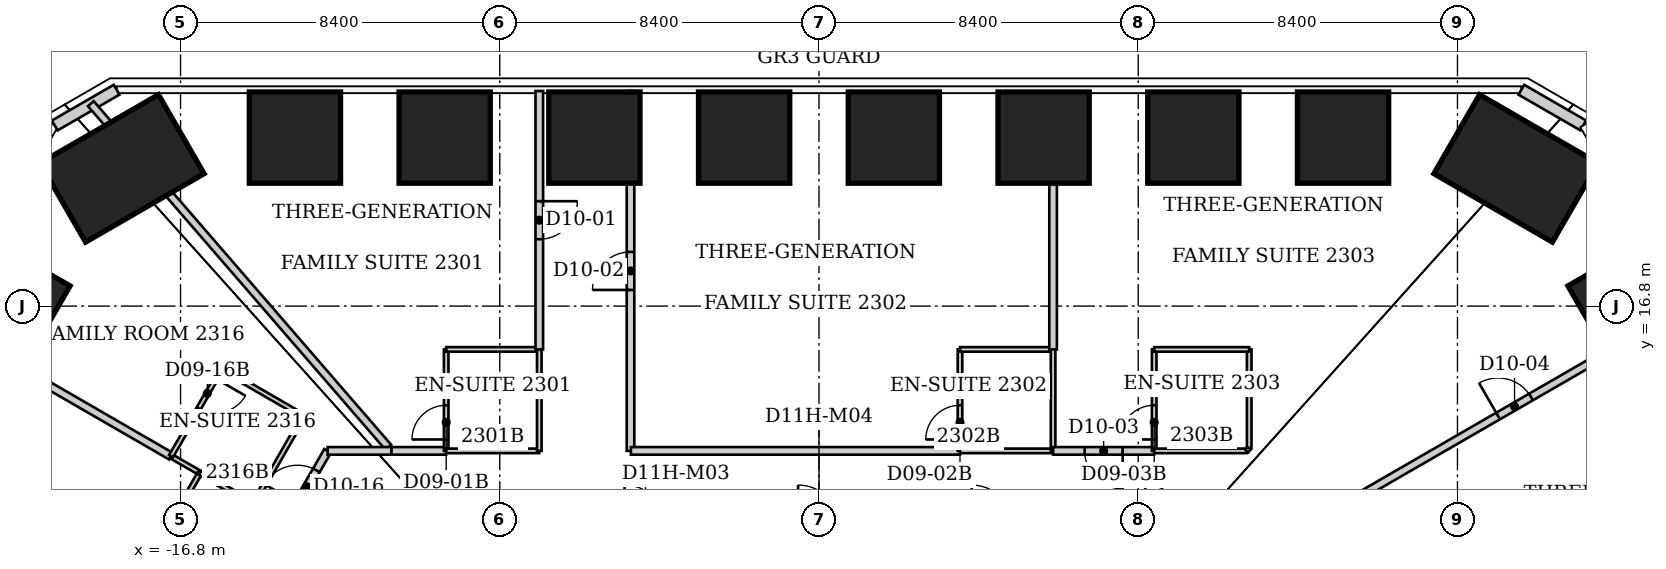
"""IFC4 building model, lengths in metres.
Left out: names, types, materials, properties, quantities, classifications, styles, units other than length and angle.
Written with IfcOpenShell. Run it as: python <this file> out.ifc"""

import sys

from ifc_helpers import new_model, si_unit, direction, frame, frame_2d, origin, origin_2d, place, context, subcontext, project, spatial, rectangle, extrude, clip, halfspace, element, fill, save


model = new_model("IFC4")
c1 = context("Model", 3, precision=1e-05, world=origin(), true_north=direction((0.0, 1.0)))
c2 = subcontext(c1, "Body", "Model", "MODEL_VIEW")
j1 = project(units=[si_unit("LENGTHUNIT", "METRE"), si_unit("PLANEANGLEUNIT", "RADIAN")], contexts=[c1])
p1 = place(None, origin())
s1 = spatial("IfcSite", under=j1, at=p1, CompositionType="ELEMENT")
p2 = place(p1, origin())
s2 = spatial("IfcBuilding", under=s1, at=p2, CompositionType="ELEMENT")
p3 = place(p2, frame((0.0, 0.0, 96.8)))
s3 = spatial("IfcBuildingStorey", under=s2, at=p3, CompositionType="ELEMENT", Elevation=96.8)
p4 = place(p3, frame((-13.79, 21.234, -0.073), z_axis=(0.0, 0.0, 1.0), x_axis=(0.0, 1.0, 0.0)))
e1 = element("IfcColumn", 1, at=p4, inside=s3, PredefinedType="COLUMN", context=c2, shape_type="SweptSolid", body=[
    clip(extrude(rectangle(XDim=2.4, YDim=2.4, at=origin_2d()), origin(), (0.0, 0.0, 1.0), 3.873), halfspace(frame((0.0, 0.0, 0.073)), True)),
])
p5 = place(p3, frame((-9.85, 21.234, -0.064), z_axis=(0.0, 0.0, 1.0), x_axis=(0.0, 1.0, 0.0)))
e2 = element("IfcColumn", 2, at=p5, inside=s3, PredefinedType="COLUMN", context=c2, shape_type="SweptSolid", body=[
    clip(extrude(rectangle(XDim=2.4, YDim=2.4, at=origin_2d()), origin(), (0.0, 0.0, 1.0), 3.865), halfspace(frame((0.0, 0.0, 0.064)), True)),
])
p6 = place(p3, frame((-5.91, 21.234, -0.056), z_axis=(0.0, 0.0, 1.0), x_axis=(0.0, 1.0, 0.0)))
e3 = element("IfcColumn", 3, at=p6, inside=s3, PredefinedType="COLUMN", context=c2, shape_type="SweptSolid", body=[
    clip(extrude(rectangle(XDim=2.4, YDim=2.4, at=origin_2d()), origin(), (0.0, 0.0, 1.0), 3.856), halfspace(frame((0.0, 0.0, 0.056)), True)),
])
for number, where, z_axis, x_axis in (
    (4, (-1.97, 21.234, -0.048), (0.0, 0.0, 1.0), (0.0, 1.0, 0.0)),
    (5, (1.97, 21.234, -0.048), (0.0, 0.0, 1.0), (0.0, 1.0, 0.0)),
):
    element("IfcColumn", number, at=place(p3, frame(where, z_axis=z_axis, x_axis=x_axis)), inside=s3, PredefinedType="COLUMN", context=c2, shape_type="SweptSolid", body=[
        clip(extrude(rectangle(XDim=2.4, YDim=2.4, at=origin_2d()), origin(), (0.0, 0.0, 1.0), 3.848), halfspace(frame((0.0, 0.0, 0.048)), True)),
    ])
p7 = place(p3, frame((5.91, 21.234, -0.056), z_axis=(0.0, 0.0, 1.0), x_axis=(0.0, 1.0, 0.0)))
e6 = element("IfcColumn", 6, at=p7, inside=s3, PredefinedType="COLUMN", context=c2, shape_type="SweptSolid", body=[
    clip(extrude(rectangle(XDim=2.4, YDim=2.4, at=origin_2d()), origin(), (0.0, 0.0, 1.0), 3.856), halfspace(frame((0.0, 0.0, 0.056)), True)),
])
p8 = place(p3, frame((9.85, 21.234, -0.064), z_axis=(0.0, 0.0, 1.0), x_axis=(0.0, 1.0, 0.0)))
e7 = element("IfcColumn", 7, at=p8, inside=s3, PredefinedType="COLUMN", context=c2, shape_type="SweptSolid", body=[
    clip(extrude(rectangle(XDim=2.4, YDim=2.4, at=origin_2d()), origin(), (0.0, 0.0, 1.0), 3.865), halfspace(frame((0.0, 0.0, 0.064)), True)),
])
p9 = place(p3, frame((13.79, 21.234, -0.073), z_axis=(0.0, 0.0, 1.0), x_axis=(0.0, 1.0, 0.0)))
e8 = element("IfcColumn", 8, at=p9, inside=s3, PredefinedType="COLUMN", context=c2, shape_type="SweptSolid", body=[
    clip(extrude(rectangle(XDim=2.4, YDim=2.4, at=origin_2d()), origin(), (0.0, 0.0, 1.0), 3.873), halfspace(frame((0.0, 0.0, 0.073)), True)),
])
p10 = place(p3, frame((18.339, 20.424, -0.074), z_axis=(0.0, 0.0, 1.0), x_axis=(0.5, 0.866025403784, 0.0)))
e9 = element("IfcColumn", 9, at=p10, inside=s3, PredefinedType="COLUMN", context=c2, shape_type="SweptSolid", body=[
    clip(extrude(rectangle(XDim=2.4, YDim=3.6, at=origin_2d()), origin(), (0.0, 0.0, 1.0), 3.874), halfspace(frame((0.0, 0.0, 0.074)), True)),
])
for number, where, z_axis, x_axis in (
    (10, (21.346, 16.891, -0.063), (0.0, 0.0, 1.0), (0.866, 0.5, 0.0)),
    (11, (-21.346, 16.891, -0.063), (0.0, 0.0, 1.0), (-0.866, 0.5, 0.0)),
):
    element("IfcColumn", number, at=place(p3, frame(where, z_axis=z_axis, x_axis=x_axis)), inside=s3, PredefinedType="COLUMN", context=c2, shape_type="SweptSolid", body=[
        clip(extrude(rectangle(XDim=2.4, YDim=2.4, at=origin_2d()), origin(), (0.0, 0.0, 1.0), 3.863), halfspace(frame((0.0, 0.0, 0.063)), True)),
    ])
p11 = place(p3, frame((-18.339, 20.424, -0.074), z_axis=(0.0, 0.0, 1.0), x_axis=(-0.5, 0.866025403784, 0.0)))
e12 = element("IfcColumn", 12, at=p11, inside=s3, PredefinedType="COLUMN", context=c2, shape_type="SweptSolid", body=[
    clip(extrude(rectangle(XDim=2.4, YDim=3.6, at=origin_2d()), origin(), (0.0, 0.0, 1.0), 3.874), halfspace(frame((0.0, 0.0, 0.074)), True)),
])
for number, where, z_axis, x_axis in (
    (13, (18.481, 22.494, 0.0), (0.0, 0.0, 1.0), (0.866, -0.5, 0.0)),
    (14, (-20.11, 21.554, 0.0), (0.0, 0.0, 1.0), (0.866, 0.5, 0.0)),
):
    element("IfcWall", number, at=place(p3, frame(where, z_axis=z_axis, x_axis=x_axis)), inside=s3, PredefinedType="SOLIDWALL", context=c2, shape_type="SweptSolid", body=[
        extrude(rectangle(XDim=1.88, YDim=0.3, at=frame_2d((0.94, 0.0))), origin(), (0.0, 0.0, 1.0), 3.64),
    ])
for number, where, z_axis, x_axis in (
    (15, (-19.75, 24.133, 0.0), (0.0, 0.0, 1.0), (-0.866, -0.499, 0.0)),
    (16, (21.475, 23.139, 0.0), (0.0, 0.0, 1.0), (-0.866, 0.499, 0.0)),
):
    element("IfcWall", number, at=place(p3, frame(where, z_axis=z_axis, x_axis=x_axis)), inside=s3, PredefinedType="PARAPET", context=c2, shape_type="SweptSolid", body=[
        extrude(rectangle(XDim=1.991, YDim=0.25, at=frame_2d((0.996, 0.0))), origin(), (0.0, 0.0, 1.0), 1.1),
    ])
p12 = place(p3, frame((-23.084, 16.335, 0.0), z_axis=(0.0, 0.0, 1.0), x_axis=(0.865889693368, -0.500234983702, 0.0)))
e17 = element("IfcWall", 17, at=p12, inside=s3, PredefinedType="PARTITIONING", context=c2, shape_type="SweptSolid", body=[
    extrude(rectangle(XDim=6.968, YDim=0.2, at=frame_2d((3.484, 0.0))), origin(), (0.0, 0.0, 1.0), 3.64),
])
p13 = place(p3, frame((-17.051, 12.849, 0.0), z_axis=(0.0, 0.0, 1.0), x_axis=(0.865838315616, -0.500323906295, 0.0)))
e18 = element("IfcWall", 18, at=p13, inside=s3, PredefinedType="PARTITIONING", context=c2, shape_type="SweptSolid", body=[
    extrude(rectangle(XDim=0.878, YDim=0.12, at=frame_2d((0.439, 0.0))), origin(), (0.0, 0.0, 1.0), 3.64),
])
p14 = place(p3, frame((-16.29, 12.41, 0.0), z_axis=(0.0, 0.0, 1.0), x_axis=(-0.501547039172, -0.865130376012, 0.0)))
e19 = element("IfcWall", 19, at=p14, inside=s3, PredefinedType="PARTITIONING", context=c2, shape_type="SweptSolid", body=[
    extrude(rectangle(XDim=2.393, YDim=0.12, at=frame_2d((1.196, 0.0))), origin(), (0.0, 0.0, 1.0), 3.64),
])
p15 = place(p3, frame((-16.29, 12.41, 0.0), z_axis=(0.0, 0.0, 1.0), x_axis=(0.866138091645, -0.499804768086, 0.0)))
e20 = element("IfcWall", 20, at=p15, inside=s3, PredefinedType="PARTITIONING", context=c2, shape_type="SweptSolid", body=[
    extrude(rectangle(XDim=1.626, YDim=0.12, at=frame_2d((0.813, 0.0))), origin(), (0.0, 0.0, 1.0), 3.64),
])
p16 = place(p3, frame((-15.72, 15.15, 0.0), z_axis=(0.0, 0.0, 1.0), x_axis=(-0.500605174168, -0.865675724273, 0.0)))
e21 = element("IfcWall", 21, at=p16, inside=s3, PredefinedType="PARTITIONING", context=c2, shape_type="SweptSolid", body=[
    extrude(rectangle(XDim=2.657, YDim=0.12, at=frame_2d((1.329, 0.0))), origin(), (0.0, 0.0, 1.0), 3.64),
])
p17 = place(p16, frame((0.3, 0.0, 0.0)))
e22 = element("IfcOpeningElement", 22, at=p17, cuts=e21, PredefinedType="OPENING", context=c2, shape_type="SweptSolid", body=[
    extrude(rectangle(XDim=0.9, YDim=2.03, at=frame_2d((0.45, 1.015))), frame((0.0, 0.06, 0.0), z_axis=(0.0, -1.0, 0.0), x_axis=(1.0, 0.0, 0.0)), (0.0, 0.0, 1.0), 0.12),
])
p18 = place(p3, frame((-14.88, 11.6, 0.0), z_axis=(0.0, 0.0, 1.0), x_axis=(0.497704656183, 0.867346571569, 0.0)))
e23 = element("IfcWall", 23, at=p18, inside=s3, PredefinedType="PARTITIONING", context=c2, shape_type="SweptSolid", body=[
    extrude(rectangle(XDim=2.652, YDim=0.12, at=frame_2d((1.326, 0.0))), origin(), (0.0, 0.0, 1.0), 3.64),
])
p19 = place(p3, frame((-14.02, 11.1, 0.0), z_axis=(0.0, 0.0, 1.0), x_axis=(0.499641723021, 0.866232156305, 0.0)))
e24 = element("IfcWall", 24, at=p19, inside=s3, PredefinedType="PARTITIONING", context=c2, shape_type="SweptSolid", body=[
    extrude(rectangle(XDim=2.182, YDim=0.2, at=frame_2d((1.091, 0.0))), origin(), (0.0, 0.0, 1.0), 3.64),
])
p20 = place(p19, frame((0.591, 0.0, 0.0)))
e25 = element("IfcOpeningElement", 25, at=p20, cuts=e24, PredefinedType="OPENING", context=c2, shape_type="SweptSolid", body=[
    extrude(rectangle(XDim=1.0, YDim=2.13, at=frame_2d((0.5, 1.065))), frame((0.0, 0.1, 0.0), z_axis=(0.0, -1.0, 0.0), x_axis=(1.0, 0.0, 0.0)), (0.0, 0.0, 1.0), 0.2),
])
p21 = place(p3, frame((-13.56, 13.9, 0.0), z_axis=(0.0, 0.0, 1.0), x_axis=(-0.865508881864, 0.500893576935, 0.0)))
e26 = element("IfcWall", 26, at=p21, inside=s3, PredefinedType="PARTITIONING", context=c2, shape_type="SweptSolid", body=[
    extrude(rectangle(XDim=2.496, YDim=0.12, at=frame_2d((1.248, 0.0))), origin(), (0.0, 0.0, 1.0), 3.64),
])
p22 = place(p3, frame((-11.335, 13.088, 0.0), z_axis=(0.0, 0.0, 1.0), x_axis=(-0.654526953183, 0.75603866803, 0.0)))
e27 = element("IfcWall", 27, at=p22, inside=s3, PredefinedType="PARTITIONING", context=c2, shape_type="SweptSolid", body=[
    extrude(rectangle(XDim=11.956, YDim=0.2, at=frame_2d((5.978, 0.0))), origin(), (0.0, 0.0, 1.0), 3.64),
])
p23 = place(p3, frame((-11.25, 12.99, 0.0), z_axis=(0.0, 0.0, 1.0), x_axis=(-1.0, 0.0, 0.0)))
e28 = element("IfcWall", 28, at=p23, inside=s3, PredefinedType="PARTITIONING", context=c2, shape_type="SweptSolid", body=[
    extrude(rectangle(XDim=1.68, YDim=0.2, at=frame_2d((0.84, 0.0))), origin(), (0.0, 0.0, 1.0), 3.64),
])
p24 = place(p3, frame((-9.81, 12.99, 0.0), z_axis=(0.0, 0.0, 1.0), x_axis=(-1.0, 0.0, 0.0)))
e29 = element("IfcWall", 29, at=p24, inside=s3, PredefinedType="PARTITIONING", context=c2, shape_type="SweptSolid", body=[
    extrude(rectangle(XDim=1.44, YDim=0.2, at=frame_2d((0.72, 0.0))), origin(), (0.0, 0.0, 1.0), 3.64),
])
p25 = place(p3, frame((-9.81, 15.66, 0.0), z_axis=(0.0, 0.0, 1.0), x_axis=(0.0, -1.0, 0.0)))
e30 = element("IfcWall", 30, at=p25, inside=s3, PredefinedType="PARTITIONING", context=c2, shape_type="SweptSolid", body=[
    extrude(rectangle(XDim=2.67, YDim=0.12, at=frame_2d((1.335, 0.0))), origin(), (0.0, 0.0, 1.0), 3.038),
])
p26 = place(p25, frame((1.47, 0.0, 0.0)))
e31 = element("IfcOpeningElement", 31, at=p26, cuts=e30, PredefinedType="OPENING", context=c2, shape_type="SweptSolid", body=[
    extrude(rectangle(XDim=0.9, YDim=2.03, at=frame_2d((0.45, 1.015))), frame((0.0, 0.06, 0.0), z_axis=(0.0, -1.0, 0.0), x_axis=(1.0, 0.0, 0.0)), (0.0, 0.0, 1.0), 0.12),
])
for number, where, z_axis, x_axis in (
    (32, (-7.36, 12.99, 0.0), (0.0, 0.0, 1.0), (-1.0, 0.0, 0.0)),
    (33, (-7.36, 15.66, 0.0), (0.0, 0.0, 1.0), (-1.0, 0.0, 0.0)),
):
    element("IfcWall", number, at=place(p3, frame(where, z_axis=z_axis, x_axis=x_axis)), inside=s3, PredefinedType="PARTITIONING", context=c2, shape_type="SweptSolid", body=[
        extrude(rectangle(XDim=2.45, YDim=0.12, at=frame_2d((1.225, 0.0))), origin(), (0.0, 0.0, 1.0), 3.64),
    ])
p27 = place(p3, frame((-7.36, 15.66, 0.0), z_axis=(0.0, 0.0, 1.0), x_axis=(0.0, -1.0, 0.0)))
e34 = element("IfcWall", 34, at=p27, inside=s3, PredefinedType="PARTITIONING", context=c2, shape_type="SweptSolid", body=[
    extrude(rectangle(XDim=2.67, YDim=0.12, at=frame_2d((1.335, 0.0))), origin(), (0.0, 0.0, 1.0), 3.64),
])
p28 = place(p3, frame((-7.36, 22.46, 0.0), z_axis=(0.0, 0.0, 1.0), x_axis=(0.0, -1.0, 0.0)))
e35 = element("IfcWall", 35, at=p28, inside=s3, PredefinedType="PARTITIONING", context=c2, shape_type="SweptSolid", body=[
    extrude(rectangle(XDim=6.8, YDim=0.2, at=frame_2d((3.4, 0.0))), origin(), (0.0, 0.0, 1.0), 3.64),
])
p29 = place(p28, frame((2.9, 0.0, 0.0)))
e36 = element("IfcOpeningElement", 36, at=p29, cuts=e35, PredefinedType="OPENING", context=c2, shape_type="SweptSolid", body=[
    extrude(rectangle(XDim=1.0, YDim=2.13, at=frame_2d((0.5, 1.065))), frame((0.0, 0.1, 0.0), z_axis=(0.0, -1.0, 0.0), x_axis=(1.0, 0.0, 0.0)), (0.0, 0.0, 1.0), 0.2),
])
p30 = place(p3, frame((-4.96, 12.99, 0.0), z_axis=(0.0, 0.0, 1.0), x_axis=(0.0, 1.0, 0.0)))
e37 = element("IfcWall", 37, at=p30, inside=s3, PredefinedType="PARTITIONING", context=c2, shape_type="SweptSolid", body=[
    extrude(rectangle(XDim=9.47, YDim=0.2, at=frame_2d((4.735, 0.0))), origin(), (0.0, 0.0, 1.0), 3.64),
])
p31 = place(p30, frame((4.235, 0.0, 0.0)))
e38 = element("IfcOpeningElement", 38, at=p31, cuts=e37, PredefinedType="OPENING", context=c2, shape_type="SweptSolid", body=[
    extrude(rectangle(XDim=1.0, YDim=2.13, at=frame_2d((0.5, 1.065))), frame((0.0, 0.1, 0.0), z_axis=(0.0, -1.0, 0.0), x_axis=(1.0, 0.0, 0.0)), (0.0, 0.0, 1.0), 0.2),
])
p32 = place(p3, frame((3.71, 12.99, 0.0), z_axis=(0.0, 0.0, 1.0), x_axis=(-1.0, 0.0, 0.0)))
e39 = element("IfcWall", 39, at=p32, inside=s3, PredefinedType="PARTITIONING", context=c2, shape_type="SweptSolid", body=[
    extrude(rectangle(XDim=8.66, YDim=0.2, at=frame_2d((4.33, 0.0))), origin(), (0.0, 0.0, 1.0), 3.64),
])
p33 = place(p3, frame((3.71, 15.66, 0.0), z_axis=(0.0, 0.0, 1.0), x_axis=(0.0, -1.0, 0.0)))
e40 = element("IfcWall", 40, at=p33, inside=s3, PredefinedType="PARTITIONING", context=c2, shape_type="SweptSolid", body=[
    extrude(rectangle(XDim=2.67, YDim=0.12, at=frame_2d((1.335, 0.0))), origin(), (0.0, 0.0, 1.0), 3.64),
])
p34 = place(p33, frame((1.47, 0.0, 0.0)))
e41 = element("IfcOpeningElement", 41, at=p34, cuts=e40, PredefinedType="OPENING", context=c2, shape_type="SweptSolid", body=[
    extrude(rectangle(XDim=0.9, YDim=2.03, at=frame_2d((0.45, 1.015))), frame((0.0, 0.06, 0.0), z_axis=(0.0, -1.0, 0.0), x_axis=(1.0, 0.0, 0.0)), (0.0, 0.0, 1.0), 0.12),
])
for number, where, z_axis, x_axis in (
    (42, (6.16, 12.99, 0.0), (0.0, 0.0, 1.0), (-1.0, 0.0, 0.0)),
    (43, (6.16, 15.66, 0.0), (0.0, 0.0, 1.0), (-1.0, 0.0, 0.0)),
):
    element("IfcWall", number, at=place(p3, frame(where, z_axis=z_axis, x_axis=x_axis)), inside=s3, PredefinedType="PARTITIONING", context=c2, shape_type="SweptSolid", body=[
        extrude(rectangle(XDim=2.45, YDim=0.12, at=frame_2d((1.225, 0.0))), origin(), (0.0, 0.0, 1.0), 3.64),
    ])
p35 = place(p3, frame((6.16, 15.66, 0.0), z_axis=(0.0, 0.0, 1.0), x_axis=(0.0, -1.0, 0.0)))
e44 = element("IfcWall", 44, at=p35, inside=s3, PredefinedType="PARTITIONING", context=c2, shape_type="SweptSolid", body=[
    extrude(rectangle(XDim=2.67, YDim=0.12, at=frame_2d((1.335, 0.0))), origin(), (0.0, 0.0, 1.0), 3.64),
])
p36 = place(p3, frame((6.16, 22.37, 0.0), z_axis=(0.0, 0.0, 1.0), x_axis=(0.0, -1.0, 0.0)))
e45 = element("IfcWall", 45, at=p36, inside=s3, PredefinedType="PARTITIONING", context=c2, shape_type="SweptSolid", body=[
    extrude(rectangle(XDim=6.71, YDim=0.2, at=frame_2d((3.355, 0.0))), origin(), (0.0, 0.0, 1.0), 3.64),
])
p37 = place(p3, frame((8.82, 12.99, 0.0), z_axis=(0.0, 0.0, 1.0), x_axis=(-1.0, 0.0, 0.0)))
e46 = element("IfcWall", 46, at=p37, inside=s3, PredefinedType="PARTITIONING", context=c2, shape_type="SweptSolid", body=[
    extrude(rectangle(XDim=2.66, YDim=0.2, at=frame_2d((1.33, 0.0))), origin(), (0.0, 0.0, 1.0), 3.64),
])
p38 = place(p37, frame((0.83, 0.0, 0.0)))
e47 = element("IfcOpeningElement", 47, at=p38, cuts=e46, PredefinedType="OPENING", context=c2, shape_type="SweptSolid", body=[
    extrude(rectangle(XDim=1.0, YDim=2.13, at=frame_2d((0.5, 1.065))), frame((0.0, 0.1, 0.0), z_axis=(0.0, -1.0, 0.0), x_axis=(1.0, 0.0, 0.0)), (0.0, 0.0, 1.0), 0.2),
])
p39 = place(p3, frame((8.82, 15.66, 0.0), z_axis=(0.0, 0.0, 1.0), x_axis=(0.0, -1.0, 0.0)))
e48 = element("IfcWall", 48, at=p39, inside=s3, PredefinedType="PARTITIONING", context=c2, shape_type="SweptSolid", body=[
    extrude(rectangle(XDim=2.67, YDim=0.12, at=frame_2d((1.335, 0.0))), origin(), (0.0, 0.0, 1.0), 3.64),
])
p40 = place(p39, frame((1.47, 0.0, 0.0)))
e49 = element("IfcOpeningElement", 49, at=p40, cuts=e48, PredefinedType="OPENING", context=c2, shape_type="SweptSolid", body=[
    extrude(rectangle(XDim=0.9, YDim=2.03, at=frame_2d((0.45, 1.015))), frame((0.0, 0.06, 0.0), z_axis=(0.0, -1.0, 0.0), x_axis=(1.0, 0.0, 0.0)), (0.0, 0.0, 1.0), 0.12),
])
p41 = place(p3, frame((11.25, 12.99, 0.0), z_axis=(0.0, 0.0, 1.0), x_axis=(-1.0, 0.0, 0.0)))
e50 = element("IfcWall", 50, at=p41, inside=s3, PredefinedType="PARTITIONING", context=c2, shape_type="SweptSolid", body=[
    extrude(rectangle(XDim=2.43, YDim=0.12, at=frame_2d((1.215, 0.0))), origin(), (0.0, 0.0, 1.0), 3.64),
])
p42 = place(p3, frame((11.32, 13.07, 0.0), z_axis=(0.0, 0.0, 1.0), x_axis=(-0.658504607869, -0.752576694707, 0.0)))
e51 = element("IfcWall", 51, at=p42, inside=s3, PredefinedType="PARTITIONING", context=c2, shape_type="SweptSolid", body=[
    extrude(rectangle(XDim=0.106, YDim=0.12, at=frame_2d((0.053, 0.0))), origin(), (0.0, 0.0, 1.0), 3.64),
])
p43 = place(p3, frame((11.32, 13.07, 0.0), z_axis=(0.0, 0.0, 1.0), x_axis=(0.0, 1.0, 0.0)))
e52 = element("IfcWall", 52, at=p43, inside=s3, PredefinedType="PARTITIONING", context=c2, shape_type="SweptSolid", body=[
    extrude(rectangle(XDim=2.59, YDim=0.12, at=frame_2d((1.295, 0.0))), origin(), (0.0, 0.0, 1.0), 3.64),
])
p44 = place(p3, frame((11.32, 15.66, 0.0), z_axis=(0.0, 0.0, 1.0), x_axis=(-1.0, 0.0, 0.0)))
e53 = element("IfcWall", 53, at=p44, inside=s3, PredefinedType="PARTITIONING", context=c2, shape_type="SweptSolid", body=[
    extrude(rectangle(XDim=2.5, YDim=0.12, at=frame_2d((1.25, 0.0))), origin(), (0.0, 0.0, 1.0), 3.64),
])
p45 = place(p3, frame((13.77, 11.54, 0.0), z_axis=(0.0, 0.0, 1.0), x_axis=(0.865951726818, 0.500127590541, 0.0)))
e54 = element("IfcWall", 54, at=p45, inside=s3, PredefinedType="PARTITIONING", context=c2, shape_type="SweptSolid", body=[
    extrude(rectangle(XDim=10.467, YDim=0.2, at=frame_2d((5.233, 0.0))), origin(), (0.0, 0.0, 1.0), 3.64),
])
p46 = place(p45, frame((4.734, 0.0, 0.0)))
e55 = element("IfcOpeningElement", 55, at=p46, cuts=e54, PredefinedType="OPENING", context=c2, shape_type="SweptSolid", body=[
    extrude(rectangle(XDim=1.0, YDim=2.13, at=frame_2d((0.5, 1.065))), frame((0.0, 0.1, 0.0), z_axis=(0.0, -1.0, 0.0), x_axis=(1.0, 0.0, 0.0)), (0.0, 0.0, 1.0), 0.2),
])
p47 = place(p29, origin())
e56 = element("IfcDoor", 56, at=p47, inside=s3, OperationType="SINGLE_SWING_LEFT", PredefinedType="DOOR", context=c2, shape_type="SweptSolid", body=[
    extrude(rectangle(XDim=1.0, YDim=2.13, at=frame_2d((0.5, 1.065))), frame((0.0, 0.025, 0.0), z_axis=(0.0, -1.0, 0.0), x_axis=(1.0, 0.0, 0.0)), (0.0, 0.0, 1.0), 0.05),
])
fill(e36, e56)
p48 = place(p26, origin())
e57 = element("IfcDoor", 57, at=p48, inside=s3, OperationType="SINGLE_SWING_RIGHT", PredefinedType="DOOR", context=c2, shape_type="SweptSolid", body=[
    extrude(rectangle(XDim=0.9, YDim=2.03, at=frame_2d((0.45, 1.015))), frame((0.0, 0.025, 0.0), z_axis=(0.0, -1.0, 0.0), x_axis=(1.0, 0.0, 0.0)), (0.0, 0.0, 1.0), 0.05),
])
fill(e31, e57)
p49 = place(p31, origin())
e58 = element("IfcDoor", 58, at=p49, inside=s3, OperationType="SINGLE_SWING_LEFT", PredefinedType="DOOR", context=c2, shape_type="SweptSolid", body=[
    extrude(rectangle(XDim=1.0, YDim=2.13, at=frame_2d((0.5, 1.065))), frame((0.0, 0.025, 0.0), z_axis=(0.0, -1.0, 0.0), x_axis=(1.0, 0.0, 0.0)), (0.0, 0.0, 1.0), 0.05),
])
fill(e38, e58)
p50 = place(p34, origin())
e59 = element("IfcDoor", 59, at=p50, inside=s3, OperationType="SINGLE_SWING_RIGHT", PredefinedType="DOOR", context=c2, shape_type="SweptSolid", body=[
    extrude(rectangle(XDim=0.9, YDim=2.03, at=frame_2d((0.45, 1.015))), frame((0.0, 0.025, 0.0), z_axis=(0.0, -1.0, 0.0), x_axis=(1.0, 0.0, 0.0)), (0.0, 0.0, 1.0), 0.05),
])
fill(e41, e59)
p51 = place(p38, origin())
e60 = element("IfcDoor", 60, at=p51, inside=s3, OperationType="SINGLE_SWING_LEFT", PredefinedType="DOOR", context=c2, shape_type="SweptSolid", body=[
    extrude(rectangle(XDim=1.0, YDim=2.13, at=frame_2d((0.5, 1.065))), frame((0.0, 0.025, 0.0), z_axis=(0.0, -1.0, 0.0), x_axis=(1.0, 0.0, 0.0)), (0.0, 0.0, 1.0), 0.05),
])
fill(e47, e60)
p52 = place(p40, origin())
e61 = element("IfcDoor", 61, at=p52, inside=s3, OperationType="SINGLE_SWING_RIGHT", PredefinedType="DOOR", context=c2, shape_type="SweptSolid", body=[
    extrude(rectangle(XDim=0.9, YDim=2.03, at=frame_2d((0.45, 1.015))), frame((0.0, 0.025, 0.0), z_axis=(0.0, -1.0, 0.0), x_axis=(1.0, 0.0, 0.0)), (0.0, 0.0, 1.0), 0.05),
])
fill(e49, e61)
p53 = place(p46, origin())
e62 = element("IfcDoor", 62, at=p53, inside=s3, OperationType="SINGLE_SWING_LEFT", PredefinedType="DOOR", context=c2, shape_type="SweptSolid", body=[
    extrude(rectangle(XDim=1.0, YDim=2.13, at=frame_2d((0.5, 1.065))), frame((0.0, 0.025, 0.0), z_axis=(0.0, -1.0, 0.0), x_axis=(1.0, 0.0, 0.0)), (0.0, 0.0, 1.0), 0.05),
])
fill(e55, e62)
p54 = place(p20, origin())
e63 = element("IfcDoor", 63, at=p54, inside=s3, OperationType="SINGLE_SWING_LEFT", PredefinedType="DOOR", context=c2, shape_type="SweptSolid", body=[
    extrude(rectangle(XDim=1.0, YDim=2.13, at=frame_2d((0.5, 1.065))), frame((0.0, 0.025, 0.0), z_axis=(0.0, -1.0, 0.0), x_axis=(1.0, 0.0, 0.0)), (0.0, 0.0, 1.0), 0.05),
])
fill(e25, e63)
p55 = place(p17, origin())
e64 = element("IfcDoor", 64, at=p55, inside=s3, OperationType="SINGLE_SWING_LEFT", PredefinedType="DOOR", context=c2, shape_type="SweptSolid", body=[
    extrude(rectangle(XDim=0.9, YDim=2.03, at=frame_2d((0.45, 1.015))), frame((0.0, 0.025, 0.0), z_axis=(0.0, -1.0, 0.0), x_axis=(1.0, 0.0, 0.0)), (0.0, 0.0, 1.0), 0.05),
])
fill(e22, e64)
save(model, sys.argv[1])
